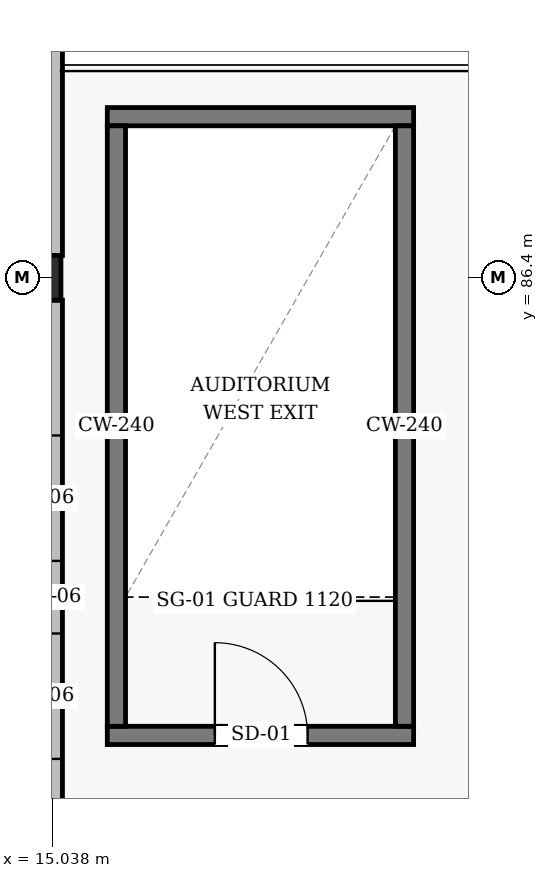
"""IFC4 building model, lengths in metres.
Left out: names, types, materials, properties, quantities, classifications, styles, units other than length and angle.
Written with IfcOpenShell. Run it as: python <this file> out.ifc"""

import sys

from ifc_helpers import new_model, si_unit, direction, frame, frame_2d, origin, origin_2d, place, context, subcontext, project, spatial, rectangle, i_section, extrude, element, fill, save


model = new_model("IFC4")
c1 = context("Model", 3, precision=1e-05, world=origin(), true_north=direction((0.0, 1.0)))
c2 = subcontext(c1, "Body", "Model", "MODEL_VIEW")
j1 = project(units=[si_unit("LENGTHUNIT", "METRE"), si_unit("PLANEANGLEUNIT", "RADIAN")], contexts=[c1])
p1 = place(None, origin())
s1 = spatial("IfcSite", under=j1, at=p1, CompositionType="ELEMENT")
p2 = place(p1, origin())
s2 = spatial("IfcBuilding", under=s1, at=p2, CompositionType="ELEMENT")
p3 = place(p2, frame((0.0, 0.0, 4.8)))
s3 = spatial("IfcBuildingStorey", under=s2, at=p3, CompositionType="ELEMENT", Elevation=4.8)
p4 = place(p3, frame((15.0, 86.4, 0.0), z_axis=(0.0, 0.0, 1.0), x_axis=(1.0, 0.0, 0.0)))
e1 = element("IfcColumn", 1, at=p4, inside=s3, PredefinedType="COLUMN", context=c2, shape_type="SweptSolid", body=[
    extrude(i_section(OverallWidth=0.3, OverallDepth=0.588, WebThickness=0.012, FlangeThickness=0.02, FilletRadius=0.024, at=origin_2d()), origin(), (0.0, 0.0, 1.0), 4.2),
])
p5 = place(p3, frame((15.0, 94.506, -0.245), z_axis=(0.0, 0.0, 1.0), x_axis=(0.0, -1.0, 0.0)))
e2 = element("IfcWall", 2, at=p5, inside=s3, PredefinedType="SOLIDWALL", context=c2, shape_type="SweptSolid", body=[
    extrude(rectangle(XDim=7.812, YDim=0.34, at=frame_2d((3.906, 0.0))), origin(), (0.0, 0.0, 1.0), 4.025),
])
p6 = place(p3, frame((15.0, 86.106, 0.0), z_axis=(0.0, 0.0, 1.0), x_axis=(0.0, -1.0, 0.0)))
e3 = element("IfcWall", 3, at=p6, inside=s3, PredefinedType="SOLIDWALL", context=c2, shape_type="SweptSolid", body=[
    extrude(rectangle(XDim=7.815, YDim=0.34, at=frame_2d((3.907, 0.0))), origin(), (0.0, 0.0, 1.0), 3.78),
])
p7 = place(p6, frame((1.78, 0.0, 0.85)))
e4 = element("IfcOpeningElement", 4, at=p7, cuts=e3, PredefinedType="OPENING", context=c2, shape_type="SweptSolid", body=[
    extrude(rectangle(XDim=1.65, YDim=2.1, at=frame_2d((0.825, 1.05))), frame((0.0, 0.18, 0.0), z_axis=(0.0, -1.0, 0.0), x_axis=(1.0, 0.0, 0.0)), (0.0, 0.0, 1.0), 0.36),
])
p8 = place(p6, frame((4.385, 0.0, 0.85)))
e5 = element("IfcOpeningElement", 5, at=p8, cuts=e3, PredefinedType="OPENING", context=c2, shape_type="SweptSolid", body=[
    extrude(rectangle(XDim=1.65, YDim=2.1, at=frame_2d((0.825, 1.05))), frame((0.0, 0.18, 0.0), z_axis=(0.0, -1.0, 0.0), x_axis=(1.0, 0.0, 0.0)), (0.0, 0.0, 1.0), 0.36),
])
p9 = place(p3, frame((15.76, 80.38, 0.0), z_axis=(0.0, 0.0, 1.0), x_axis=(1.0, 0.0, 0.0)))
e6 = element("IfcWall", 6, at=p9, inside=s3, PredefinedType="SHEAR", context=c2, shape_type="SweptSolid", body=[
    extrude(rectangle(XDim=4.03, YDim=0.24, at=frame_2d((2.015, 0.0))), origin(), (0.0, 0.0, 1.0), 3.955),
])
p10 = place(p9, frame((1.415, 0.0, 0.0)))
e7 = element("IfcOpeningElement", 7, at=p10, cuts=e6, PredefinedType="OPENING", context=c2, shape_type="SweptSolid", body=[
    extrude(rectangle(XDim=1.22, YDim=2.18, at=frame_2d((0.61, 1.09))), frame((0.0, 0.13, 0.0), z_axis=(0.0, -1.0, 0.0), x_axis=(1.0, 0.0, 0.0)), (0.0, 0.0, 1.0), 0.26),
])
p11 = place(p3, frame((15.76, 88.52, 0.0), z_axis=(0.0, 0.0, 1.0), x_axis=(1.0, 0.0, 0.0)))
e8 = element("IfcWall", 8, at=p11, inside=s3, PredefinedType="SHEAR", context=c2, shape_type="SweptSolid", body=[
    extrude(rectangle(XDim=4.03, YDim=0.24, at=frame_2d((2.015, 0.0))), origin(), (0.0, 0.0, 1.0), 3.955),
])
for number, where, z_axis, x_axis in (
    (9, (15.88, 80.5, 0.0), (0.0, 0.0, 1.0), (0.0, 1.0, 0.0)),
    (10, (19.67, 80.5, 0.0), (0.0, 0.0, 1.0), (0.0, 1.0, 0.0)),
):
    element("IfcWall", number, at=place(p3, frame(where, z_axis=z_axis, x_axis=x_axis)), inside=s3, PredefinedType="SHEAR", context=c2, shape_type="SweptSolid", body=[
        extrude(rectangle(XDim=7.9, YDim=0.24, at=frame_2d((3.95, 0.0))), origin(), (0.0, 0.0, 1.0), 3.955),
    ])
p12 = place(p10, origin())
e11 = element("IfcDoor", 11, at=p12, inside=s3, OperationType="SINGLE_SWING_LEFT", PredefinedType="DOOR", context=c2, shape_type="SweptSolid", body=[
    extrude(rectangle(XDim=1.22, YDim=2.18, at=frame_2d((0.61, 1.09))), frame((0.0, 0.025, 0.0), z_axis=(0.0, -1.0, 0.0), x_axis=(1.0, 0.0, 0.0)), (0.0, 0.0, 1.0), 0.05),
])
fill(e7, e11)
save(model, sys.argv[1])
